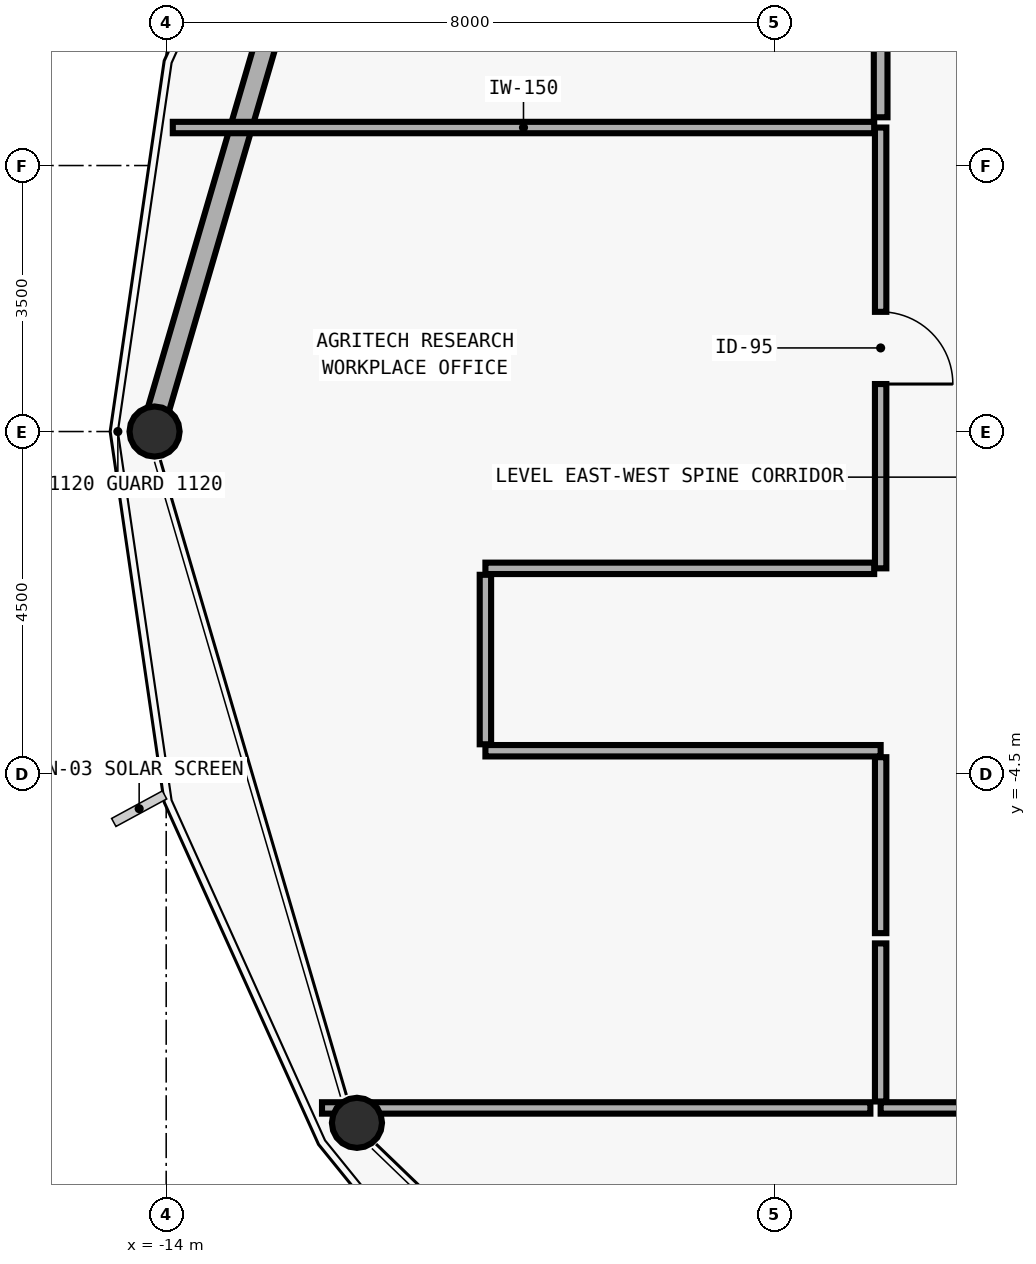
"""IFC4 building model, lengths in metres.
Left out: names, types, materials, properties, quantities, classifications, styles, units other than length and angle.
Written with IfcOpenShell. Run it as: python <this file> out.ifc"""

import sys

from ifc_helpers import new_model, si_unit, direction, frame, frame_2d, origin, origin_2d, place, context, subcontext, project, spatial, rectangle, hollow_circle, extrude, element, fill, save


model = new_model("IFC4")
c1 = context("Model", 3, precision=1e-05, world=origin(), true_north=direction((0.0, 1.0)))
c2 = subcontext(c1, "Body", "Model", "MODEL_VIEW")
j1 = project(units=[si_unit("LENGTHUNIT", "METRE"), si_unit("PLANEANGLEUNIT", "RADIAN")], contexts=[c1])
p1 = place(None, origin())
s1 = spatial("IfcSite", under=j1, at=p1, CompositionType="ELEMENT")
p2 = place(p1, origin())
s2 = spatial("IfcBuilding", under=s1, at=p2, CompositionType="ELEMENT")
p3 = place(p2, frame((0.0, 0.0, 218.4)))
s3 = spatial("IfcBuildingStorey", under=s2, at=p3, CompositionType="ELEMENT", Elevation=218.4)
p4 = place(p3, frame((-14.187, 0.0, 0.0), z_axis=(0.01904871465, 0.0, 0.999818556774), x_axis=(0.0, 1.0, 0.0)))
e1 = element("IfcColumn", 1, at=p4, inside=s3, PredefinedType="COLUMN", context=c2, shape_type="SweptSolid", body=[
    extrude(hollow_circle(Radius=0.33, WallThickness=0.025, at=origin_2d()), origin(), (0.0, 0.0, 1.0), 3.576),
])
p5 = place(p3, frame((-11.52, -9.104, 0.0), z_axis=(0.016454835979, 0.00477941294, 0.999853187015), x_axis=(-0.278928739366, 0.960311802674, 0.0)))
e2 = element("IfcColumn", 2, at=p5, inside=s3, PredefinedType="COLUMN", context=c2, shape_type="SweptSolid", body=[
    extrude(hollow_circle(Radius=0.33, WallThickness=0.025, at=origin_2d()), origin(), (0.0, 0.0, 1.0), 3.576),
])
p6 = place(p3, frame((-14.107, 0.273, 0.0), z_axis=(0.0, 0.0, 1.0), x_axis=(0.281173062834, 0.95965707872, 0.0)))
e3 = element("IfcWall", 3, at=p6, inside=s3, PredefinedType="SOLIDWALL", context=c2, shape_type="SweptSolid", body=[
    extrude(rectangle(XDim=8.917, YDim=0.28, at=frame_2d((4.459, 0.0))), origin(), (0.0, 0.0, 1.0), 2.93),
])
p7 = place(p3, frame((-4.6, 4.0, 0.0), z_axis=(0.0, 0.0, 1.0), x_axis=(0.0, -1.0, 0.0)))
e4 = element("IfcWall", 4, at=p7, inside=s3, PredefinedType="PARTITIONING", context=c2, shape_type="SweptSolid", body=[
    extrude(rectangle(XDim=5.8, YDim=0.15, at=frame_2d((2.9, 0.0))), origin(), (0.0, 0.0, 1.0), 3.36),
])
p8 = place(p7, frame((2.425, 0.0, 0.0)))
e5 = element("IfcOpeningElement", 5, at=p8, cuts=e4, PredefinedType="OPENING", context=c2, shape_type="SweptSolid", body=[
    extrude(rectangle(XDim=0.95, YDim=2.1, at=frame_2d((0.475, 1.05))), frame((0.0, 0.085, 0.0), z_axis=(0.0, -1.0, 0.0), x_axis=(1.0, 0.0, 0.0)), (0.0, 0.0, 1.0), 0.17),
])
p9 = place(p3, frame((-4.6, -8.9, 0.0), z_axis=(0.0, 0.0, 1.0), x_axis=(1.0, 0.0, 0.0)))
e6 = element("IfcWall", 6, at=p9, inside=s3, PredefinedType="PARTITIONING", context=c2, shape_type="SweptSolid", body=[
    extrude(rectangle(XDim=2.465, YDim=0.15, at=frame_2d((1.232, 0.0))), origin(), (0.0, 0.0, 1.0), 3.36),
])
p10 = place(p3, frame((-11.95, -8.9, 0.0), z_axis=(0.0, 0.0, 1.0), x_axis=(1.0, 0.0, 0.0)))
e7 = element("IfcWall", 7, at=p10, inside=s3, PredefinedType="PARTITIONING", context=c2, shape_type="SweptSolid", body=[
    extrude(rectangle(XDim=7.215, YDim=0.15, at=frame_2d((3.607, 0.0))), origin(), (0.0, 0.0, 1.0), 2.842),
])
p11 = place(p3, frame((-4.685, -1.8, 0.0), z_axis=(0.0, 0.0, 1.0), x_axis=(-1.0, 0.0, 0.0)))
e8 = element("IfcWall", 8, at=p11, inside=s3, PredefinedType="PARTITIONING", context=c2, shape_type="SweptSolid", body=[
    extrude(rectangle(XDim=5.115, YDim=0.15, at=frame_2d((2.558, 0.0))), origin(), (0.0, 0.0, 1.0), 3.36),
])
p12 = place(p3, frame((-9.8, -4.2, 0.0), z_axis=(0.0, 0.0, 1.0), x_axis=(1.0, 0.0, 0.0)))
e9 = element("IfcWall", 9, at=p12, inside=s3, PredefinedType="PARTITIONING", context=c2, shape_type="SweptSolid", body=[
    extrude(rectangle(XDim=5.2, YDim=0.15, at=frame_2d((2.6, 0.0))), origin(), (0.0, 0.0, 1.0), 3.36),
])
p13 = place(p3, frame((-9.8, -1.885, 0.0), z_axis=(0.0, 0.0, 1.0), x_axis=(0.0, -1.0, 0.0)))
e10 = element("IfcWall", 10, at=p13, inside=s3, PredefinedType="PARTITIONING", context=c2, shape_type="SweptSolid", body=[
    extrude(rectangle(XDim=2.23, YDim=0.15, at=frame_2d((1.115, 0.0))), origin(), (0.0, 0.0, 1.0), 3.36),
])
p14 = place(p3, frame((-4.6, -4.285, 0.0), z_axis=(0.0, 0.0, 1.0), x_axis=(0.0, -1.0, 0.0)))
e11 = element("IfcWall", 11, at=p14, inside=s3, PredefinedType="PARTITIONING", context=c2, shape_type="SweptSolid", body=[
    extrude(rectangle(XDim=2.315, YDim=0.15, at=frame_2d((1.158, 0.0))), origin(), (0.0, 0.0, 1.0), 3.36),
])
p15 = place(p3, frame((-4.6, -6.735, 0.0), z_axis=(0.0, 0.0, 1.0), x_axis=(0.0, -1.0, 0.0)))
e12 = element("IfcWall", 12, at=p15, inside=s3, PredefinedType="PARTITIONING", context=c2, shape_type="SweptSolid", body=[
    extrude(rectangle(XDim=2.08, YDim=0.15, at=frame_2d((1.04, 0.0))), origin(), (0.0, 0.0, 1.0), 3.36),
])
p16 = place(p3, frame((-13.913, 4.0, 0.0), z_axis=(0.0, 0.0, 1.0), x_axis=(1.0, 0.0, 0.0)))
e13 = element("IfcWall", 13, at=p16, inside=s3, PredefinedType="PARTITIONING", context=c2, shape_type="SweptSolid", body=[
    extrude(rectangle(XDim=9.228, YDim=0.15, at=frame_2d((4.614, 0.0))), origin(), (0.0, 0.0, 1.0), 3.36),
])
p17 = place(p3, frame((-4.6, 5.9, 0.0), z_axis=(0.0, 0.0, 1.0), x_axis=(0.0, -1.0, 0.0)))
e14 = element("IfcWall", 14, at=p17, inside=s3, PredefinedType="PLUMBINGWALL", context=c2, shape_type="SweptSolid", body=[
    extrude(rectangle(XDim=1.765, YDim=0.18, at=frame_2d((0.882, 0.0))), origin(), (0.0, 0.0, 1.0), 3.36),
])
p18 = place(p8, origin())
e15 = element("IfcDoor", 15, at=p18, inside=s3, OperationType="SINGLE_SWING_RIGHT", PredefinedType="DOOR", context=c2, shape_type="SweptSolid", body=[
    extrude(rectangle(XDim=0.95, YDim=2.1, at=frame_2d((0.475, 1.05))), frame((0.0, 0.025, 0.0), z_axis=(0.0, -1.0, 0.0), x_axis=(1.0, 0.0, 0.0)), (0.0, 0.0, 1.0), 0.05),
])
fill(e5, e15)
save(model, sys.argv[1])
